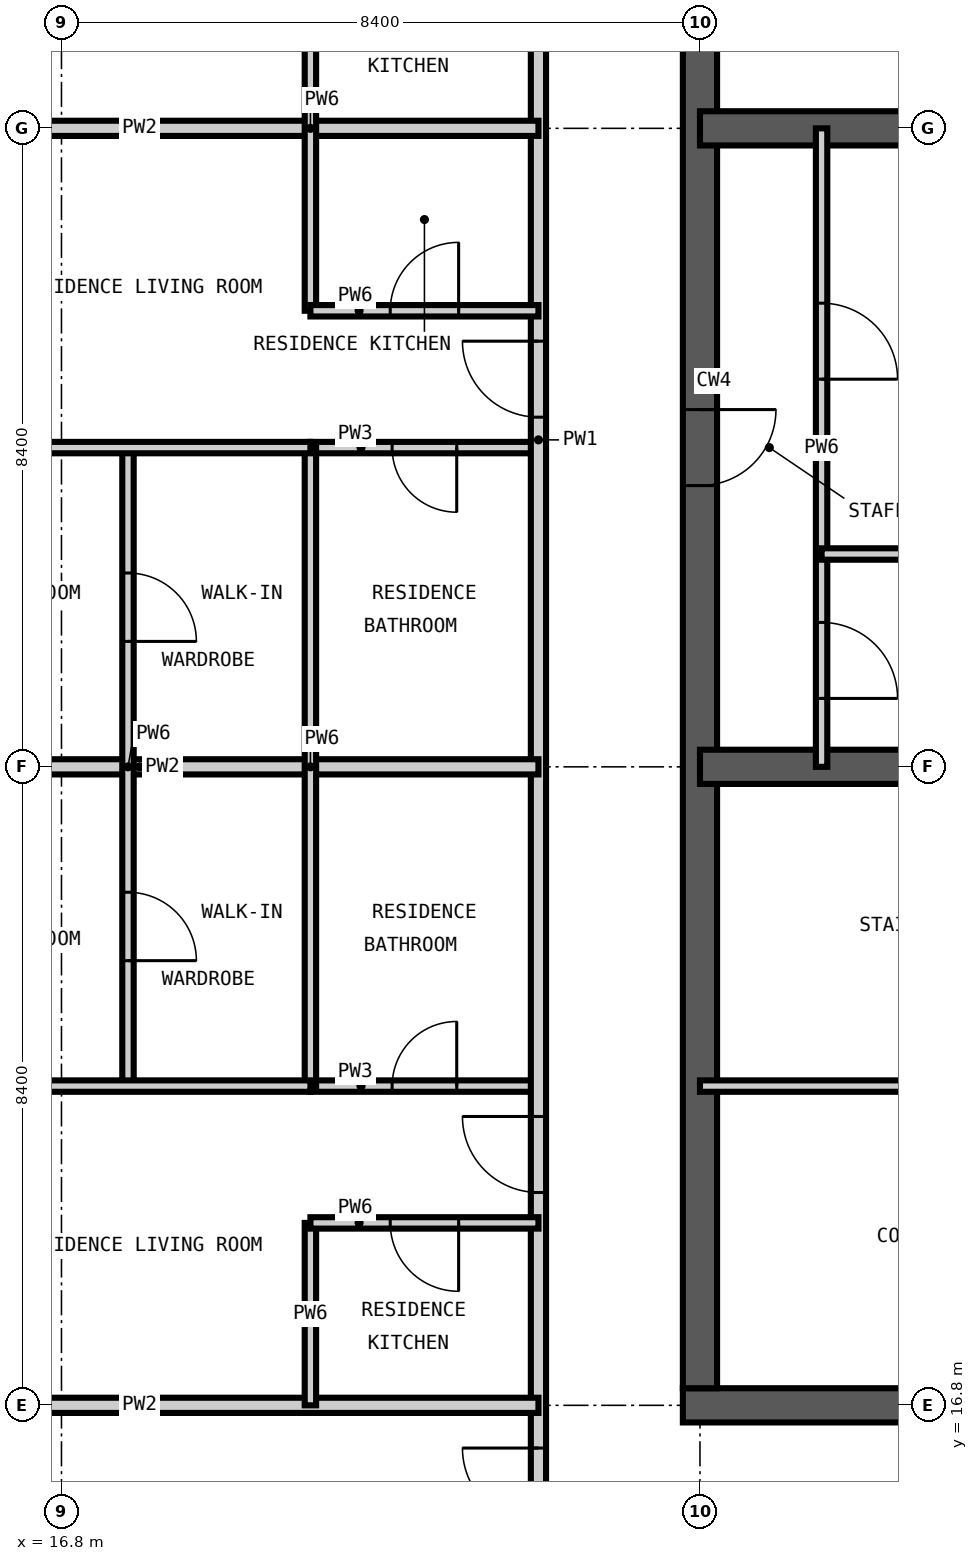
"""IFC4 building model, lengths in metres.
Left out: names, types, materials, properties, quantities, classifications, styles, units other than length and angle.
Written with IfcOpenShell. Run it as: python <this file> out.ifc"""

import sys

from ifc_helpers import new_model, si_unit, direction, frame, frame_2d, origin, place, context, subcontext, project, spatial, rectangle, extrude, element, fill, save


model = new_model("IFC4")
c1 = context("Model", 3, precision=1e-05, world=origin(), true_north=direction((0.0, 1.0)))
c2 = subcontext(c1, "Body", "Model", "MODEL_VIEW")
j1 = project(units=[si_unit("LENGTHUNIT", "METRE"), si_unit("PLANEANGLEUNIT", "RADIAN")], contexts=[c1])
p1 = place(None, origin())
s1 = spatial("IfcSite", under=j1, at=p1, CompositionType="ELEMENT")
p2 = place(p1, origin())
s2 = spatial("IfcBuilding", under=s1, at=p2, CompositionType="ELEMENT")
p3 = place(p2, frame((0.0, 0.0, 252.9)))
s3 = spatial("IfcBuildingStorey", under=s2, at=p3, CompositionType="ELEMENT", Elevation=252.9)
p4 = place(p3, frame((24.975, 16.8, -0.35), z_axis=(0.0, 0.0, 1.0), x_axis=(1.0, 0.0, 0.0)))
e1 = element("IfcWall", 1, at=p4, inside=s3, PredefinedType="SHEAR", context=c2, shape_type="SweptSolid", body=[
    extrude(rectangle(XDim=17.25, YDim=0.45, at=frame_2d((8.625, 0.0))), origin(), (0.0, 0.0, 1.0), 3.9),
])
p5 = place(p4, frame((3.925, 0.0, 0.35)))
e2 = element("IfcOpeningElement", 2, at=p5, cuts=e1, PredefinedType="OPENING", context=c2, shape_type="SweptSolid", body=[
    extrude(rectangle(XDim=1.0, YDim=2.1, at=frame_2d((0.5, 1.05))), frame((0.0, 0.235, 0.0), z_axis=(0.0, -1.0, 0.0), x_axis=(1.0, 0.0, 0.0)), (0.0, 0.0, 1.0), 0.47),
])
p6 = place(p4, frame((10.225, 0.0, 0.35)))
e3 = element("IfcOpeningElement", 3, at=p6, cuts=e1, PredefinedType="OPENING", context=c2, shape_type="SweptSolid", body=[
    extrude(rectangle(XDim=1.0, YDim=2.1, at=frame_2d((0.5, 1.05))), frame((0.0, 0.235, 0.0), z_axis=(0.0, -1.0, 0.0), x_axis=(1.0, 0.0, 0.0)), (0.0, 0.0, 1.0), 0.47),
])
p7 = place(p3, frame((25.2, 41.775, -0.35), z_axis=(0.0, 0.0, 1.0), x_axis=(0.0, -1.0, 0.0)))
e4 = element("IfcWall", 4, at=p7, inside=s3, PredefinedType="SHEAR", context=c2, shape_type="SweptSolid", body=[
    extrude(rectangle(XDim=24.75, YDim=0.45, at=frame_2d((12.375, 0.0))), origin(), (0.0, 0.0, 1.0), 3.9),
])
p8 = place(p7, frame((11.875, 0.0, 0.35)))
e5 = element("IfcOpeningElement", 5, at=p8, cuts=e4, PredefinedType="OPENING", context=c2, shape_type="SweptSolid", body=[
    extrude(rectangle(XDim=1.0, YDim=2.1, at=frame_2d((0.5, 1.05))), frame((0.0, 0.235, 0.0), z_axis=(0.0, -1.0, 0.0), x_axis=(1.0, 0.0, 0.0)), (0.0, 0.0, 1.0), 0.47),
])
for number, where, z_axis, x_axis in (
    (6, (25.2, 25.2, -0.35), (0.0, 0.0, 1.0), (1.0, 0.0, 0.0)),
    (7, (25.2, 33.6, -0.35), (0.0, 0.0, 1.0), (1.0, 0.0, 0.0)),
):
    element("IfcWall", number, at=place(p3, frame(where, z_axis=z_axis, x_axis=x_axis)), inside=s3, PredefinedType="SHEAR", context=c2, shape_type="SweptSolid", body=[
        extrude(rectangle(XDim=16.8, YDim=0.45, at=frame_2d((8.4, 0.0))), origin(), (0.0, 0.0, 1.0), 3.9),
    ])
p9 = place(p3, frame((20.075, 21.0, 0.0), z_axis=(0.0, 0.0, 1.0), x_axis=(1.0, 0.0, 0.0)))
e8 = element("IfcWall", 8, at=p9, inside=s3, PredefinedType="PARTITIONING", context=c2, shape_type="SweptSolid", body=[
    extrude(rectangle(XDim=3.0, YDim=0.15, at=frame_2d((1.5, 0.0))), origin(), (0.0, 0.0, 1.0), 3.55),
])
p10 = place(p9, frame((1.075, 0.0, 0.0)))
e9 = element("IfcOpeningElement", 9, at=p10, cuts=e8, PredefinedType="OPENING", context=c2, shape_type="SweptSolid", body=[
    extrude(rectangle(XDim=0.85, YDim=2.1, at=frame_2d((0.425, 1.05))), frame((0.0, 0.085, 0.0), z_axis=(0.0, -1.0, 0.0), x_axis=(1.0, 0.0, 0.0)), (0.0, 0.0, 1.0), 0.17),
])
p11 = place(p3, frame((20.075, 29.4, 0.0), z_axis=(0.0, 0.0, 1.0), x_axis=(1.0, 0.0, 0.0)))
e10 = element("IfcWall", 10, at=p11, inside=s3, PredefinedType="PARTITIONING", context=c2, shape_type="SweptSolid", body=[
    extrude(rectangle(XDim=3.0, YDim=0.15, at=frame_2d((1.5, 0.0))), origin(), (0.0, 0.0, 1.0), 3.55),
])
p12 = place(p11, frame((1.075, 0.0, 0.0)))
e11 = element("IfcOpeningElement", 11, at=p12, cuts=e10, PredefinedType="OPENING", context=c2, shape_type="SweptSolid", body=[
    extrude(rectangle(XDim=0.85, YDim=2.1, at=frame_2d((0.425, 1.05))), frame((0.0, 0.085, 0.0), z_axis=(0.0, -1.0, 0.0), x_axis=(1.0, 0.0, 0.0)), (0.0, 0.0, 1.0), 0.17),
])
p13 = place(p3, frame((23.075, 14.675, 0.0), z_axis=(0.0, 0.0, 1.0), x_axis=(0.0, 1.0, 0.0)))
e12 = element("IfcWall", 12, at=p13, inside=s3, PredefinedType="PARTITIONING", context=c2, shape_type="SweptSolid", body=[
    extrude(rectangle(XDim=30.65, YDim=0.2, at=frame_2d((15.325, 0.0))), origin(), (0.0, 0.0, 1.0), 3.55),
])
p14 = place(p13, frame((4.925, 0.0, 0.0)))
e13 = element("IfcOpeningElement", 13, at=p14, cuts=e12, PredefinedType="OPENING", context=c2, shape_type="SweptSolid", body=[
    extrude(rectangle(XDim=1.0, YDim=2.2, at=frame_2d((0.5, 1.1))), frame((0.0, 0.11, 0.0), z_axis=(0.0, -1.0, 0.0), x_axis=(1.0, 0.0, 0.0)), (0.0, 0.0, 1.0), 0.22),
])
p15 = place(p13, frame((15.125, 0.0, 0.0)))
e14 = element("IfcOpeningElement", 14, at=p15, cuts=e12, PredefinedType="OPENING", context=c2, shape_type="SweptSolid", body=[
    extrude(rectangle(XDim=1.0, YDim=2.2, at=frame_2d((0.5, 1.1))), frame((0.0, 0.11, 0.0), z_axis=(0.0, -1.0, 0.0), x_axis=(1.0, 0.0, 0.0)), (0.0, 0.0, 1.0), 0.22),
])
p16 = place(p13, frame((21.725, 0.0, 0.0)))
e15 = element("IfcOpeningElement", 15, at=p16, cuts=e12, PredefinedType="OPENING", context=c2, shape_type="SweptSolid", body=[
    extrude(rectangle(XDim=1.0, YDim=2.2, at=frame_2d((0.5, 1.1))), frame((0.0, 0.11, 0.0), z_axis=(0.0, -1.0, 0.0), x_axis=(1.0, 0.0, 0.0)), (0.0, 0.0, 1.0), 0.22),
])
p17 = place(p13, frame((0.563, 0.0, 0.0)))
e16 = element("IfcOpeningElement", 16, at=p17, cuts=e12, PredefinedType="OPENING", context=c2, shape_type="SweptSolid", body=[
    extrude(rectangle(XDim=1.0, YDim=2.2, at=frame_2d((0.5, 1.1))), frame((0.0, 0.11, 0.0), z_axis=(0.0, -1.0, 0.0), x_axis=(1.0, 0.0, 0.0)), (0.0, 0.0, 1.0), 0.22),
])
p18 = place(p13, frame((28.488, 0.0, 0.0)))
e17 = element("IfcOpeningElement", 17, at=p18, cuts=e12, PredefinedType="OPENING", context=c2, shape_type="SweptSolid", body=[
    extrude(rectangle(XDim=1.0, YDim=2.2, at=frame_2d((0.5, 1.1))), frame((0.0, 0.11, 0.0), z_axis=(0.0, -1.0, 0.0), x_axis=(1.0, 0.0, 0.0)), (0.0, 0.0, 1.0), 0.22),
])
for number, where, z_axis, x_axis in (
    (18, (12.582, 16.8, 0.0), (0.0, 0.0, 1.0), (1.0, 0.0, 0.0)),
    (19, (12.582, 25.2, 0.0), (0.0, 0.0, 1.0), (1.0, 0.0, 0.0)),
    (20, (12.582, 33.6, 0.0), (0.0, 0.0, 1.0), (1.0, 0.0, 0.0)),
):
    element("IfcWall", number, at=place(p3, frame(where, z_axis=z_axis, x_axis=x_axis)), inside=s3, PredefinedType="PARTITIONING", context=c2, shape_type="SweptSolid", body=[
        extrude(rectangle(XDim=10.493, YDim=0.2, at=frame_2d((5.247, 0.0))), origin(), (0.0, 0.0, 1.0), 3.55),
    ])
p19 = place(p3, frame((17.675, 21.0, 0.0), z_axis=(0.0, 0.0, 1.0), x_axis=(0.0, 1.0, 0.0)))
e21 = element("IfcWall", 21, at=p19, inside=s3, PredefinedType="PARTITIONING", context=c2, shape_type="SweptSolid", body=[
    extrude(rectangle(XDim=8.4, YDim=0.15, at=frame_2d((4.2, 0.0))), origin(), (0.0, 0.0, 1.0), 3.55),
])
p20 = place(p19, frame((1.65, 0.0, 0.0)))
e22 = element("IfcOpeningElement", 22, at=p20, cuts=e21, PredefinedType="OPENING", context=c2, shape_type="SweptSolid", body=[
    extrude(rectangle(XDim=0.9, YDim=2.1, at=frame_2d((0.45, 1.05))), frame((0.0, 0.085, 0.0), z_axis=(0.0, -1.0, 0.0), x_axis=(1.0, 0.0, 0.0)), (0.0, 0.0, 1.0), 0.17),
])
p21 = place(p19, frame((5.85, 0.0, 0.0)))
e23 = element("IfcOpeningElement", 23, at=p21, cuts=e21, PredefinedType="OPENING", context=c2, shape_type="SweptSolid", body=[
    extrude(rectangle(XDim=0.9, YDim=2.1, at=frame_2d((0.45, 1.05))), frame((0.0, 0.085, 0.0), z_axis=(0.0, -1.0, 0.0), x_axis=(1.0, 0.0, 0.0)), (0.0, 0.0, 1.0), 0.17),
])
p22 = place(p3, frame((20.075, 16.8, 0.0), z_axis=(0.0, 0.0, 1.0), x_axis=(0.0, 1.0, 0.0)))
e24 = element("IfcWall", 24, at=p22, inside=s3, PredefinedType="PARTITIONING", context=c2, shape_type="SweptSolid", body=[
    extrude(rectangle(XDim=2.4, YDim=0.15, at=frame_2d((1.2, 0.0))), origin(), (0.0, 0.0, 1.0), 3.55),
])
p23 = place(p3, frame((20.075, 21.0, 0.0), z_axis=(0.0, 0.0, 1.0), x_axis=(0.0, 1.0, 0.0)))
e25 = element("IfcWall", 25, at=p23, inside=s3, PredefinedType="PARTITIONING", context=c2, shape_type="SweptSolid", body=[
    extrude(rectangle(XDim=8.4, YDim=0.15, at=frame_2d((4.2, 0.0))), origin(), (0.0, 0.0, 1.0), 3.55),
])
p24 = place(p3, frame((20.075, 31.2, 0.0), z_axis=(0.0, 0.0, 1.0), x_axis=(0.0, 1.0, 0.0)))
e26 = element("IfcWall", 26, at=p24, inside=s3, PredefinedType="PARTITIONING", context=c2, shape_type="SweptSolid", body=[
    extrude(rectangle(XDim=4.8, YDim=0.15, at=frame_2d((2.4, 0.0))), origin(), (0.0, 0.0, 1.0), 3.55),
])
p25 = place(p3, frame((26.8, 25.2, 0.0), z_axis=(0.0, 0.0, 1.0), x_axis=(0.0, 1.0, 0.0)))
e27 = element("IfcWall", 27, at=p25, inside=s3, PredefinedType="PARTITIONING", context=c2, shape_type="SweptSolid", body=[
    extrude(rectangle(XDim=8.4, YDim=0.15, at=frame_2d((4.2, 0.0))), origin(), (0.0, 0.0, 1.0), 3.55),
])
p26 = place(p25, frame((0.9, 0.0, 0.0)))
e28 = element("IfcOpeningElement", 28, at=p26, cuts=e27, PredefinedType="OPENING", context=c2, shape_type="SweptSolid", body=[
    extrude(rectangle(XDim=1.0, YDim=2.1, at=frame_2d((0.5, 1.05))), frame((0.0, 0.085, 0.0), z_axis=(0.0, -1.0, 0.0), x_axis=(1.0, 0.0, 0.0)), (0.0, 0.0, 1.0), 0.17),
])
p27 = place(p25, frame((5.1, 0.0, 0.0)))
e29 = element("IfcOpeningElement", 29, at=p27, cuts=e27, PredefinedType="OPENING", context=c2, shape_type="SweptSolid", body=[
    extrude(rectangle(XDim=1.0, YDim=2.1, at=frame_2d((0.5, 1.05))), frame((0.0, 0.085, 0.0), z_axis=(0.0, -1.0, 0.0), x_axis=(1.0, 0.0, 0.0)), (0.0, 0.0, 1.0), 0.17),
])
p28 = place(p3, frame((20.075, 19.2, 0.0), z_axis=(0.0, 0.0, 1.0), x_axis=(1.0, 0.0, 0.0)))
e30 = element("IfcWall", 30, at=p28, inside=s3, PredefinedType="PARTITIONING", context=c2, shape_type="SweptSolid", body=[
    extrude(rectangle(XDim=3.0, YDim=0.15, at=frame_2d((1.5, 0.0))), origin(), (0.0, 0.0, 1.0), 3.55),
])
p29 = place(p28, frame((1.05, 0.0, 0.0)))
e31 = element("IfcOpeningElement", 31, at=p29, cuts=e30, PredefinedType="OPENING", context=c2, shape_type="SweptSolid", body=[
    extrude(rectangle(XDim=0.9, YDim=2.1, at=frame_2d((0.45, 1.05))), frame((0.0, 0.085, 0.0), z_axis=(0.0, -1.0, 0.0), x_axis=(1.0, 0.0, 0.0)), (0.0, 0.0, 1.0), 0.17),
])
p30 = place(p3, frame((12.582, 21.0, 0.0), z_axis=(0.0, 0.0, 1.0), x_axis=(1.0, 0.0, 0.0)))
e32 = element("IfcWall", 32, at=p30, inside=s3, PredefinedType="PARTITIONING", context=c2, shape_type="SweptSolid", body=[
    extrude(rectangle(XDim=7.493, YDim=0.15, at=frame_2d((3.747, 0.0))), origin(), (0.0, 0.0, 1.0), 3.55),
])
p31 = place(p30, frame((2.106, 0.0, 0.0)))
e33 = element("IfcOpeningElement", 33, at=p31, cuts=e32, PredefinedType="OPENING", context=c2, shape_type="SweptSolid", body=[
    extrude(rectangle(XDim=0.9, YDim=2.1, at=frame_2d((0.45, 1.05))), frame((0.0, 0.085, 0.0), z_axis=(0.0, -1.0, 0.0), x_axis=(1.0, 0.0, 0.0)), (0.0, 0.0, 1.0), 0.17),
])
p32 = place(p3, frame((25.2, 21.0, 0.0), z_axis=(0.0, 0.0, 1.0), x_axis=(1.0, 0.0, 0.0)))
e34 = element("IfcWall", 34, at=p32, inside=s3, PredefinedType="PARTITIONING", context=c2, shape_type="SweptSolid", body=[
    extrude(rectangle(XDim=8.4, YDim=0.15, at=frame_2d((4.2, 0.0))), origin(), (0.0, 0.0, 1.0), 3.55),
])
p33 = place(p32, frame((3.7, 0.0, 0.0)))
e35 = element("IfcOpeningElement", 35, at=p33, cuts=e34, PredefinedType="OPENING", context=c2, shape_type="SweptSolid", body=[
    extrude(rectangle(XDim=1.0, YDim=2.1, at=frame_2d((0.5, 1.05))), frame((0.0, 0.085, 0.0), z_axis=(0.0, -1.0, 0.0), x_axis=(1.0, 0.0, 0.0)), (0.0, 0.0, 1.0), 0.17),
])
p34 = place(p3, frame((26.8, 28.0, 0.0), z_axis=(0.0, 0.0, 1.0), x_axis=(1.0, 0.0, 0.0)))
e36 = element("IfcWall", 36, at=p34, inside=s3, PredefinedType="PARTITIONING", context=c2, shape_type="SweptSolid", body=[
    extrude(rectangle(XDim=6.8, YDim=0.15, at=frame_2d((3.4, 0.0))), origin(), (0.0, 0.0, 1.0), 3.55),
])
p35 = place(p3, frame((12.582, 29.4, 0.0), z_axis=(0.0, 0.0, 1.0), x_axis=(1.0, 0.0, 0.0)))
e37 = element("IfcWall", 37, at=p35, inside=s3, PredefinedType="PARTITIONING", context=c2, shape_type="SweptSolid", body=[
    extrude(rectangle(XDim=7.493, YDim=0.15, at=frame_2d((3.747, 0.0))), origin(), (0.0, 0.0, 1.0), 3.55),
])
p36 = place(p35, frame((2.106, 0.0, 0.0)))
e38 = element("IfcOpeningElement", 38, at=p36, cuts=e37, PredefinedType="OPENING", context=c2, shape_type="SweptSolid", body=[
    extrude(rectangle(XDim=0.9, YDim=2.1, at=frame_2d((0.45, 1.05))), frame((0.0, 0.085, 0.0), z_axis=(0.0, -1.0, 0.0), x_axis=(1.0, 0.0, 0.0)), (0.0, 0.0, 1.0), 0.17),
])
p37 = place(p3, frame((20.075, 31.2, 0.0), z_axis=(0.0, 0.0, 1.0), x_axis=(1.0, 0.0, 0.0)))
e39 = element("IfcWall", 39, at=p37, inside=s3, PredefinedType="PARTITIONING", context=c2, shape_type="SweptSolid", body=[
    extrude(rectangle(XDim=3.0, YDim=0.15, at=frame_2d((1.5, 0.0))), origin(), (0.0, 0.0, 1.0), 3.55),
])
p38 = place(p37, frame((1.05, 0.0, 0.0)))
e40 = element("IfcOpeningElement", 40, at=p38, cuts=e39, PredefinedType="OPENING", context=c2, shape_type="SweptSolid", body=[
    extrude(rectangle(XDim=0.9, YDim=2.1, at=frame_2d((0.45, 1.05))), frame((0.0, 0.085, 0.0), z_axis=(0.0, -1.0, 0.0), x_axis=(1.0, 0.0, 0.0)), (0.0, 0.0, 1.0), 0.17),
])
p39 = place(p14, origin())
e41 = element("IfcDoor", 41, at=p39, inside=s3, OperationType="SINGLE_SWING_RIGHT", PredefinedType="DOOR", context=c2, shape_type="SweptSolid", body=[
    extrude(rectangle(XDim=1.0, YDim=2.2, at=frame_2d((0.5, 1.1))), frame((0.0, 0.025, 0.0), z_axis=(0.0, -1.0, 0.0), x_axis=(1.0, 0.0, 0.0)), (0.0, 0.0, 1.0), 0.05),
])
fill(e13, e41)
p40 = place(p29, frame((0.9, 0.0, 0.0), z_axis=(0.0, 0.0, 1.0), x_axis=(-1.0, 0.0, 0.0)))
e42 = element("IfcDoor", 42, at=p40, inside=s3, OperationType="SINGLE_SWING_LEFT", PredefinedType="DOOR", context=c2, shape_type="SweptSolid", body=[
    extrude(rectangle(XDim=0.9, YDim=2.1, at=frame_2d((0.45, 1.05))), frame((0.0, 0.025, 0.0), z_axis=(0.0, -1.0, 0.0), x_axis=(1.0, 0.0, 0.0)), (0.0, 0.0, 1.0), 0.05),
])
fill(e31, e42)
p41 = place(p10, origin())
e43 = element("IfcDoor", 43, at=p41, inside=s3, OperationType="SINGLE_SWING_RIGHT", PredefinedType="DOOR", context=c2, shape_type="SweptSolid", body=[
    extrude(rectangle(XDim=0.85, YDim=2.1, at=frame_2d((0.425, 1.05))), frame((0.0, 0.025, 0.0), z_axis=(0.0, -1.0, 0.0), x_axis=(1.0, 0.0, 0.0)), (0.0, 0.0, 1.0), 0.05),
])
fill(e9, e43)
p42 = place(p20, frame((0.9, 0.0, 0.0), z_axis=(0.0, 0.0, 1.0), x_axis=(-1.0, 0.0, 0.0)))
e44 = element("IfcDoor", 44, at=p42, inside=s3, OperationType="SINGLE_SWING_RIGHT", PredefinedType="DOOR", context=c2, shape_type="SweptSolid", body=[
    extrude(rectangle(XDim=0.9, YDim=2.1, at=frame_2d((0.45, 1.05))), frame((0.0, 0.025, 0.0), z_axis=(0.0, -1.0, 0.0), x_axis=(1.0, 0.0, 0.0)), (0.0, 0.0, 1.0), 0.05),
])
fill(e22, e44)
p43 = place(p15, origin())
e45 = element("IfcDoor", 45, at=p43, inside=s3, OperationType="SINGLE_SWING_RIGHT", PredefinedType="DOOR", context=c2, shape_type="SweptSolid", body=[
    extrude(rectangle(XDim=1.0, YDim=2.2, at=frame_2d((0.5, 1.1))), frame((0.0, 0.025, 0.0), z_axis=(0.0, -1.0, 0.0), x_axis=(1.0, 0.0, 0.0)), (0.0, 0.0, 1.0), 0.05),
])
fill(e14, e45)
p44 = place(p38, origin())
e46 = element("IfcDoor", 46, at=p44, inside=s3, OperationType="SINGLE_SWING_RIGHT", PredefinedType="DOOR", context=c2, shape_type="SweptSolid", body=[
    extrude(rectangle(XDim=0.9, YDim=2.1, at=frame_2d((0.45, 1.05))), frame((0.0, 0.025, 0.0), z_axis=(0.0, -1.0, 0.0), x_axis=(1.0, 0.0, 0.0)), (0.0, 0.0, 1.0), 0.05),
])
fill(e40, e46)
p45 = place(p12, frame((0.85, 0.0, 0.0), z_axis=(0.0, 0.0, 1.0), x_axis=(-1.0, 0.0, 0.0)))
e47 = element("IfcDoor", 47, at=p45, inside=s3, OperationType="SINGLE_SWING_LEFT", PredefinedType="DOOR", context=c2, shape_type="SweptSolid", body=[
    extrude(rectangle(XDim=0.85, YDim=2.1, at=frame_2d((0.425, 1.05))), frame((0.0, 0.025, 0.0), z_axis=(0.0, -1.0, 0.0), x_axis=(1.0, 0.0, 0.0)), (0.0, 0.0, 1.0), 0.05),
])
fill(e11, e47)
p46 = place(p21, frame((0.9, 0.0, 0.0), z_axis=(0.0, 0.0, 1.0), x_axis=(-1.0, 0.0, 0.0)))
e48 = element("IfcDoor", 48, at=p46, inside=s3, OperationType="SINGLE_SWING_RIGHT", PredefinedType="DOOR", context=c2, shape_type="SweptSolid", body=[
    extrude(rectangle(XDim=0.9, YDim=2.1, at=frame_2d((0.45, 1.05))), frame((0.0, 0.025, 0.0), z_axis=(0.0, -1.0, 0.0), x_axis=(1.0, 0.0, 0.0)), (0.0, 0.0, 1.0), 0.05),
])
fill(e23, e48)
p47 = place(p17, origin())
e49 = element("IfcDoor", 49, at=p47, inside=s3, OperationType="SINGLE_SWING_RIGHT", PredefinedType="DOOR", context=c2, shape_type="SweptSolid", body=[
    extrude(rectangle(XDim=1.0, YDim=2.2, at=frame_2d((0.5, 1.1))), frame((0.0, 0.025, 0.0), z_axis=(0.0, -1.0, 0.0), x_axis=(1.0, 0.0, 0.0)), (0.0, 0.0, 1.0), 0.05),
])
fill(e16, e49)
p48 = place(p8, origin())
e50 = element("IfcDoor", 50, at=p48, inside=s3, OperationType="SINGLE_SWING_LEFT", PredefinedType="DOOR", context=c2, shape_type="SweptSolid", body=[
    extrude(rectangle(XDim=1.0, YDim=2.1, at=frame_2d((0.5, 1.05))), frame((0.0, 0.025, 0.0), z_axis=(0.0, -1.0, 0.0), x_axis=(1.0, 0.0, 0.0)), (0.0, 0.0, 1.0), 0.05),
])
fill(e5, e50)
p49 = place(p26, frame((1.0, 0.0, 0.0), z_axis=(0.0, 0.0, 1.0), x_axis=(-1.0, 0.0, 0.0)))
e51 = element("IfcDoor", 51, at=p49, inside=s3, OperationType="SINGLE_SWING_RIGHT", PredefinedType="DOOR", context=c2, shape_type="SweptSolid", body=[
    extrude(rectangle(XDim=1.0, YDim=2.1, at=frame_2d((0.5, 1.05))), frame((0.0, 0.025, 0.0), z_axis=(0.0, -1.0, 0.0), x_axis=(1.0, 0.0, 0.0)), (0.0, 0.0, 1.0), 0.05),
])
fill(e28, e51)
p50 = place(p27, frame((1.0, 0.0, 0.0), z_axis=(0.0, 0.0, 1.0), x_axis=(-1.0, 0.0, 0.0)))
e52 = element("IfcDoor", 52, at=p50, inside=s3, OperationType="SINGLE_SWING_RIGHT", PredefinedType="DOOR", context=c2, shape_type="SweptSolid", body=[
    extrude(rectangle(XDim=1.0, YDim=2.1, at=frame_2d((0.5, 1.05))), frame((0.0, 0.025, 0.0), z_axis=(0.0, -1.0, 0.0), x_axis=(1.0, 0.0, 0.0)), (0.0, 0.0, 1.0), 0.05),
])
fill(e29, e52)
save(model, sys.argv[1])
